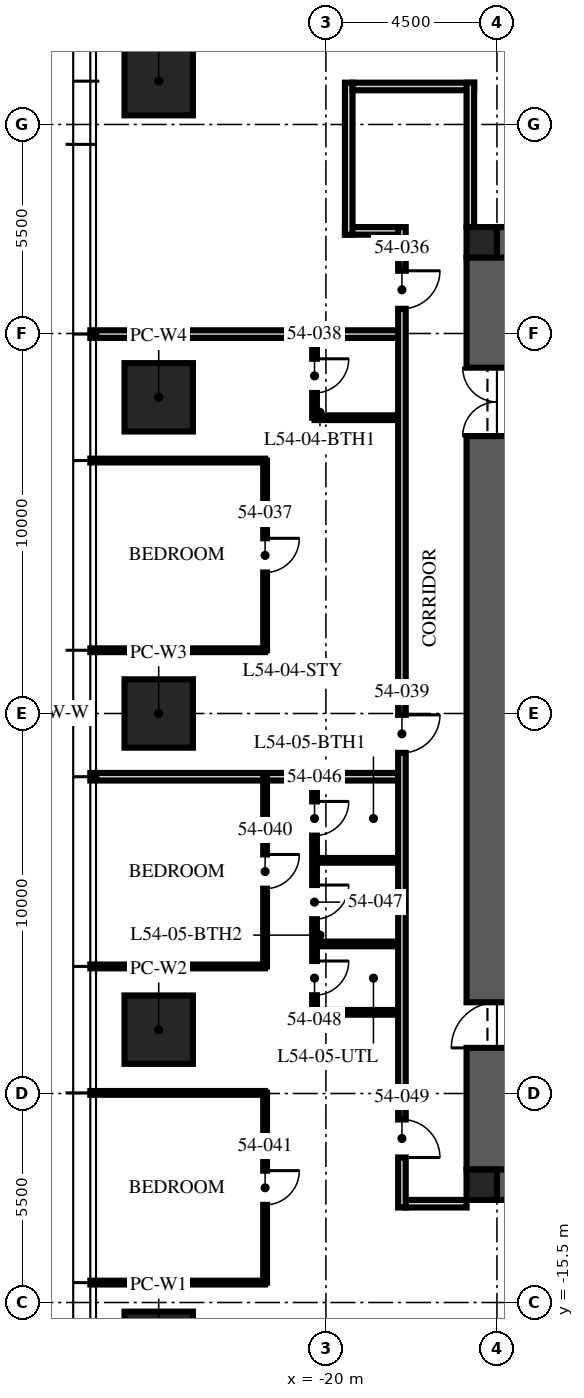
"""IFC4 building model, lengths in metres.
Left out: names, types, materials, properties, quantities, classifications, styles, units other than length and angle.
Written with IfcOpenShell. Run it as: python <this file> out.ifc"""

import sys

from ifc_helpers import new_model, si_unit, direction, frame, frame_2d, origin, origin_2d, place, context, subcontext, project, spatial, rectangle, extrude, element, fill, save


model = new_model("IFC4")
c1 = context("Model", 3, precision=1e-05, world=origin(), true_north=direction((0.0, 1.0)))
c2 = subcontext(c1, "Body", "Model", "MODEL_VIEW")
j1 = project(units=[si_unit("LENGTHUNIT", "METRE"), si_unit("PLANEANGLEUNIT", "RADIAN")], contexts=[c1])
p1 = place(None, origin())
s1 = spatial("IfcSite", under=j1, at=p1, CompositionType="ELEMENT")
p2 = place(p1, origin())
s2 = spatial("IfcBuilding", under=s1, at=p2, CompositionType="ELEMENT")
p3 = place(p2, frame((0.0, 0.0, 218.25)))
s3 = spatial("IfcBuildingStorey", under=s2, at=p3, CompositionType="ELEMENT", Elevation=218.25)
for number, where, z_axis, x_axis in (
    (1, (-15.5, 12.0, -0.25), (0.0, 0.0, 1.0), (1.0, 0.0, 0.0)),
    (2, (-15.5, -12.0, -0.25), (0.0, 0.0, 1.0), (1.0, 0.0, 0.0)),
):
    element("IfcWall", number, at=place(p3, frame(where, z_axis=z_axis, x_axis=x_axis)), inside=s3, PredefinedType="SHEAR", context=c2, shape_type="SweptSolid", body=[
        extrude(rectangle(XDim=31.0, YDim=1.6, at=frame_2d((15.5, 0.0))), origin(), (0.0, 0.0, 1.0), 3.75),
    ])
p4 = place(p3, frame((-15.5, -12.0, -0.25), z_axis=(0.0, 0.0, 1.0), x_axis=(0.0, 1.0, 0.0)))
e3 = element("IfcWall", 3, at=p4, inside=s3, PredefinedType="SHEAR", context=c2, shape_type="SweptSolid", body=[
    extrude(rectangle(XDim=24.0, YDim=1.6, at=frame_2d((12.0, 0.0))), origin(), (0.0, 0.0, 1.0), 3.75),
])
p5 = place(p4, frame((3.2, 0.0, 0.25)))
e4 = element("IfcOpeningElement", 4, at=p5, cuts=e3, PredefinedType="OPENING", context=c2, shape_type="SweptSolid", body=[
    extrude(rectangle(XDim=1.2, YDim=2.1, at=frame_2d((0.6, 1.05))), frame((0.0, 0.81, 0.0), z_axis=(0.0, -1.0, 0.0), x_axis=(1.0, 0.0, 0.0)), (0.0, 0.0, 1.0), 1.62),
])
p6 = place(p4, frame((19.3, 0.0, 0.25)))
e5 = element("IfcOpeningElement", 5, at=p6, cuts=e3, PredefinedType="OPENING", context=c2, shape_type="SweptSolid", body=[
    extrude(rectangle(XDim=1.8, YDim=2.1, at=frame_2d((0.9, 1.05))), frame((0.0, 0.81, 0.0), z_axis=(0.0, -1.0, 0.0), x_axis=(1.0, 0.0, 0.0)), (0.0, 0.0, 1.0), 1.62),
])
for number, where, z_axis, x_axis in (
    (6, (-15.9, 12.4, -0.25), (0.0, 0.0, 1.0), (1.0, 0.0, 0.0)),
    (7, (-15.9, -12.4, -0.25), (0.0, 0.0, 1.0), (1.0, 0.0, 0.0)),
):
    element("IfcColumn", number, at=place(p3, frame(where, z_axis=z_axis, x_axis=x_axis)), inside=s3, PredefinedType="COLUMN", context=c2, shape_type="SweptSolid", body=[
        extrude(rectangle(XDim=0.8, YDim=0.8, at=origin_2d()), origin(), (0.0, 0.0, 1.0), 3.75),
    ])
for number, where, z_axis, x_axis in (
    (8, (-24.4, -16.64, 0.0), (0.0, 0.0, 1.0), (0.0, 1.0, 0.0)),
    (9, (-24.4, -8.32, 0.0), (0.0, 0.0, 1.0), (0.0, 1.0, 0.0)),
    (10, (-24.4, 0.0, 0.0), (0.0, 0.0, 1.0), (0.0, 1.0, 0.0)),
    (11, (-24.4, 8.32, 0.0), (0.0, 0.0, 1.0), (0.0, 1.0, 0.0)),
    (12, (-24.4, 16.64, 0.0), (0.0, 0.0, 1.0), (0.0, 1.0, 0.0)),
):
    element("IfcColumn", number, at=place(p3, frame(where, z_axis=z_axis, x_axis=x_axis)), inside=s3, PredefinedType="COLUMN", context=c2, shape_type="SweptSolid", body=[
        extrude(rectangle(XDim=1.8, YDim=1.8, at=origin_2d()), origin(), (0.0, 0.0, 1.0), 3.75),
    ])
p7 = place(p3, frame((-18.1, 12.7, 0.0), z_axis=(0.0, 0.0, 1.0), x_axis=(-1.0, 0.0, 0.0)))
e13 = element("IfcWall", 13, at=p7, inside=s3, PredefinedType="PARTITIONING", context=c2, shape_type="SweptSolid", body=[
    extrude(rectangle(XDim=1.4, YDim=0.2, at=frame_2d((0.7, 0.0))), origin(), (0.0, 0.0, 1.0), 2.81),
])
p8 = place(p3, frame((-19.4, 12.6, 0.0), z_axis=(0.0, 0.0, 1.0), x_axis=(0.0, 1.0, 0.0)))
e14 = element("IfcWall", 14, at=p8, inside=s3, PredefinedType="PARTITIONING", context=c2, shape_type="SweptSolid", body=[
    extrude(rectangle(XDim=4.0, YDim=0.2, at=frame_2d((2.0, 0.0))), origin(), (0.0, 0.0, 1.0), 2.6),
])
p9 = place(p3, frame((-19.3, 16.5, 0.0), z_axis=(0.0, 0.0, 1.0), x_axis=(1.0, 0.0, 0.0)))
e15 = element("IfcWall", 15, at=p9, inside=s3, PredefinedType="PARTITIONING", context=c2, shape_type="SweptSolid", body=[
    extrude(rectangle(XDim=3.2, YDim=0.2, at=frame_2d((1.6, 0.0))), origin(), (0.0, 0.0, 1.0), 2.3),
])
p10 = place(p3, frame((-16.2, 16.6, 0.0), z_axis=(0.0, 0.0, 1.0), x_axis=(0.0, -1.0, 0.0)))
e16 = element("IfcWall", 16, at=p10, inside=s3, PredefinedType="PARTITIONING", context=c2, shape_type="SweptSolid", body=[
    extrude(rectangle(XDim=3.8, YDim=0.2, at=frame_2d((1.9, 0.0))), origin(), (0.0, 0.0, 1.0), 2.3),
])
p11 = place(p3, frame((-16.3, -12.9, 0.0), z_axis=(0.0, 0.0, 1.0), x_axis=(-1.0, 0.0, 0.0)))
e17 = element("IfcWall", 17, at=p11, inside=s3, PredefinedType="PARTITIONING", context=c2, shape_type="SweptSolid", body=[
    extrude(rectangle(XDim=1.6, YDim=0.2, at=frame_2d((0.8, 0.0))), origin(), (0.0, 0.0, 1.0), 2.3),
])
p12 = place(p3, frame((-18.1, 9.984, 0.0), z_axis=(0.0, 0.0, 1.0), x_axis=(-1.0, 0.0, 0.0)))
e18 = element("IfcWall", 18, at=p12, inside=s3, PredefinedType="PARTITIONING", context=c2, shape_type="SweptSolid", body=[
    extrude(rectangle(XDim=8.1, YDim=0.2, at=frame_2d((4.05, 0.0))), origin(), (0.0, 0.0, 1.0), 2.91),
])
for number, where, z_axis, x_axis in (
    (19, (-21.6, 6.656, 0.0), (0.0, 0.0, 1.0), (-1.0, 0.0, 0.0)),
    (20, (-21.6, 1.664, 0.0), (0.0, 0.0, 1.0), (-1.0, 0.0, 0.0)),
):
    element("IfcWall", number, at=place(p3, frame(where, z_axis=z_axis, x_axis=x_axis)), inside=s3, PredefinedType="PARTITIONING", context=c2, shape_type="SweptSolid", body=[
        extrude(rectangle(XDim=4.6, YDim=0.1, at=frame_2d((2.3, 0.0))), origin(), (0.0, 0.0, 1.0), 2.91),
    ])
p13 = place(p3, frame((-18.1, -1.664, 0.0), z_axis=(0.0, 0.0, 1.0), x_axis=(-1.0, 0.0, 0.0)))
e21 = element("IfcWall", 21, at=p13, inside=s3, PredefinedType="PARTITIONING", context=c2, shape_type="SweptSolid", body=[
    extrude(rectangle(XDim=8.1, YDim=0.2, at=frame_2d((4.05, 0.0))), origin(), (0.0, 0.0, 1.0), 2.91),
])
for number, where, z_axis, x_axis in (
    (22, (-21.6, -6.656, 0.0), (0.0, 0.0, 1.0), (-1.0, 0.0, 0.0)),
    (23, (-21.6, -9.984, 0.0), (0.0, 0.0, 1.0), (-1.0, 0.0, 0.0)),
    (24, (-21.6, -14.976, 0.0), (0.0, 0.0, 1.0), (-1.0, 0.0, 0.0)),
):
    element("IfcWall", number, at=place(p3, frame(where, z_axis=z_axis, x_axis=x_axis)), inside=s3, PredefinedType="PARTITIONING", context=c2, shape_type="SweptSolid", body=[
        extrude(rectangle(XDim=4.6, YDim=0.1, at=frame_2d((2.3, 0.0))), origin(), (0.0, 0.0, 1.0), 2.91),
    ])
p14 = place(p3, frame((-21.6, 6.656, 0.0), z_axis=(0.0, 0.0, 1.0), x_axis=(0.0, -1.0, 0.0)))
e25 = element("IfcWall", 25, at=p14, inside=s3, PredefinedType="PARTITIONING", context=c2, shape_type="SweptSolid", body=[
    extrude(rectangle(XDim=4.992, YDim=0.1, at=frame_2d((2.496, 0.0))), origin(), (0.0, 0.0, 1.0), 2.81),
])
p15 = place(p14, frame((2.046, 0.0, 0.0)))
e26 = element("IfcOpeningElement", 26, at=p15, cuts=e25, PredefinedType="OPENING", context=c2, shape_type="SweptSolid", body=[
    extrude(rectangle(XDim=0.9, YDim=2.1, at=frame_2d((0.45, 1.05))), frame((0.0, 0.06, 0.0), z_axis=(0.0, -1.0, 0.0), x_axis=(1.0, 0.0, 0.0)), (0.0, 0.0, 1.0), 0.12),
])
p16 = place(p3, frame((-20.3, 9.984, 0.0), z_axis=(0.0, 0.0, 1.0), x_axis=(0.0, -1.0, 0.0)))
e27 = element("IfcWall", 27, at=p16, inside=s3, PredefinedType="PARTITIONING", context=c2, shape_type="SweptSolid", body=[
    extrude(rectangle(XDim=2.2, YDim=0.125, at=frame_2d((1.1, 0.0))), origin(), (0.0, 0.0, 1.0), 2.6),
])
p17 = place(p16, frame((0.65, 0.0, 0.0)))
e28 = element("IfcOpeningElement", 28, at=p17, cuts=e27, PredefinedType="OPENING", context=c2, shape_type="SweptSolid", body=[
    extrude(rectangle(XDim=0.9, YDim=2.1, at=frame_2d((0.45, 1.05))), frame((0.0, 0.073, 0.0), z_axis=(0.0, -1.0, 0.0), x_axis=(1.0, 0.0, 0.0)), (0.0, 0.0, 1.0), 0.145),
])
p18 = place(p3, frame((-18.1, 7.784, 0.0), z_axis=(0.0, 0.0, 1.0), x_axis=(-1.0, 0.0, 0.0)))
e29 = element("IfcWall", 29, at=p18, inside=s3, PredefinedType="PARTITIONING", context=c2, shape_type="SweptSolid", body=[
    extrude(rectangle(XDim=2.2, YDim=0.125, at=frame_2d((1.1, 0.0))), origin(), (0.0, 0.0, 1.0), 3.5),
])
p19 = place(p3, frame((-21.6, -1.664, 0.0), z_axis=(0.0, 0.0, 1.0), x_axis=(0.0, -1.0, 0.0)))
e30 = element("IfcWall", 30, at=p19, inside=s3, PredefinedType="PARTITIONING", context=c2, shape_type="SweptSolid", body=[
    extrude(rectangle(XDim=4.992, YDim=0.1, at=frame_2d((2.496, 0.0))), origin(), (0.0, 0.0, 1.0), 2.81),
])
p20 = place(p19, frame((2.046, 0.0, 0.0)))
e31 = element("IfcOpeningElement", 31, at=p20, cuts=e30, PredefinedType="OPENING", context=c2, shape_type="SweptSolid", body=[
    extrude(rectangle(XDim=0.9, YDim=2.1, at=frame_2d((0.45, 1.05))), frame((0.0, 0.06, 0.0), z_axis=(0.0, -1.0, 0.0), x_axis=(1.0, 0.0, 0.0)), (0.0, 0.0, 1.0), 0.12),
])
p21 = place(p3, frame((-21.6, -9.984, 0.0), z_axis=(0.0, 0.0, 1.0), x_axis=(0.0, -1.0, 0.0)))
e32 = element("IfcWall", 32, at=p21, inside=s3, PredefinedType="PARTITIONING", context=c2, shape_type="SweptSolid", body=[
    extrude(rectangle(XDim=4.992, YDim=0.1, at=frame_2d((2.496, 0.0))), origin(), (0.0, 0.0, 1.0), 2.81),
])
p22 = place(p21, frame((2.046, 0.0, 0.0)))
e33 = element("IfcOpeningElement", 33, at=p22, cuts=e32, PredefinedType="OPENING", context=c2, shape_type="SweptSolid", body=[
    extrude(rectangle(XDim=0.9, YDim=2.1, at=frame_2d((0.45, 1.05))), frame((0.0, 0.06, 0.0), z_axis=(0.0, -1.0, 0.0), x_axis=(1.0, 0.0, 0.0)), (0.0, 0.0, 1.0), 0.12),
])
p23 = place(p3, frame((-20.3, -1.664, 0.0), z_axis=(0.0, 0.0, 1.0), x_axis=(0.0, -1.0, 0.0)))
e34 = element("IfcWall", 34, at=p23, inside=s3, PredefinedType="PARTITIONING", context=c2, shape_type="SweptSolid", body=[
    extrude(rectangle(XDim=6.2, YDim=0.125, at=frame_2d((3.1, 0.0))), origin(), (0.0, 0.0, 1.0), 2.81),
])
p24 = place(p23, frame((0.65, 0.0, 0.0)))
e35 = element("IfcOpeningElement", 35, at=p24, cuts=e34, PredefinedType="OPENING", context=c2, shape_type="SweptSolid", body=[
    extrude(rectangle(XDim=0.9, YDim=2.1, at=frame_2d((0.45, 1.05))), frame((0.0, 0.073, 0.0), z_axis=(0.0, -1.0, 0.0), x_axis=(1.0, 0.0, 0.0)), (0.0, 0.0, 1.0), 0.145),
])
p25 = place(p23, frame((2.85, 0.0, 0.0)))
e36 = element("IfcOpeningElement", 36, at=p25, cuts=e34, PredefinedType="OPENING", context=c2, shape_type="SweptSolid", body=[
    extrude(rectangle(XDim=0.9, YDim=2.1, at=frame_2d((0.45, 1.05))), frame((0.0, 0.073, 0.0), z_axis=(0.0, -1.0, 0.0), x_axis=(1.0, 0.0, 0.0)), (0.0, 0.0, 1.0), 0.145),
])
p26 = place(p23, frame((4.85, 0.0, 0.0)))
e37 = element("IfcOpeningElement", 37, at=p26, cuts=e34, PredefinedType="OPENING", context=c2, shape_type="SweptSolid", body=[
    extrude(rectangle(XDim=0.9, YDim=2.1, at=frame_2d((0.45, 1.05))), frame((0.0, 0.073, 0.0), z_axis=(0.0, -1.0, 0.0), x_axis=(1.0, 0.0, 0.0)), (0.0, 0.0, 1.0), 0.145),
])
for number, where, z_axis, x_axis in (
    (38, (-18.1, -3.864, 0.0), (0.0, 0.0, 1.0), (-1.0, 0.0, 0.0)),
    (39, (-18.1, -6.064, 0.0), (0.0, 0.0, 1.0), (-1.0, 0.0, 0.0)),
    (40, (-18.1, -7.864, 0.0), (0.0, 0.0, 1.0), (-1.0, 0.0, 0.0)),
):
    element("IfcWall", number, at=place(p3, frame(where, z_axis=z_axis, x_axis=x_axis)), inside=s3, PredefinedType="PARTITIONING", context=c2, shape_type="SweptSolid", body=[
        extrude(rectangle(XDim=2.2, YDim=0.125, at=frame_2d((1.1, 0.0))), origin(), (0.0, 0.0, 1.0), 3.5),
    ])
p27 = place(p3, frame((-18.0, 12.8, 0.0), z_axis=(0.0, 0.0, 1.0), x_axis=(0.0, -1.0, 0.0)))
e41 = element("IfcWall", 41, at=p27, inside=s3, PredefinedType="PARTITIONING", context=c2, shape_type="SweptSolid", body=[
    extrude(rectangle(XDim=25.8, YDim=0.2, at=frame_2d((12.9, 0.0))), origin(), (0.0, 0.0, 1.0), 2.6),
])
p28 = place(p27, frame((1.15, 0.0, 0.0)))
e42 = element("IfcOpeningElement", 42, at=p28, cuts=e41, PredefinedType="OPENING", context=c2, shape_type="SweptSolid", body=[
    extrude(rectangle(XDim=1.0, YDim=2.2, at=frame_2d((0.5, 1.1))), frame((0.0, 0.11, 0.0), z_axis=(0.0, -1.0, 0.0), x_axis=(1.0, 0.0, 0.0)), (0.0, 0.0, 1.0), 0.22),
])
p29 = place(p27, frame((12.836, 0.0, 0.0)))
e43 = element("IfcOpeningElement", 43, at=p29, cuts=e41, PredefinedType="OPENING", context=c2, shape_type="SweptSolid", body=[
    extrude(rectangle(XDim=1.0, YDim=2.2, at=frame_2d((0.5, 1.1))), frame((0.0, 0.11, 0.0), z_axis=(0.0, -1.0, 0.0), x_axis=(1.0, 0.0, 0.0)), (0.0, 0.0, 1.0), 0.22),
])
p30 = place(p27, frame((23.484, 0.0, 0.0)))
e44 = element("IfcOpeningElement", 44, at=p30, cuts=e41, PredefinedType="OPENING", context=c2, shape_type="SweptSolid", body=[
    extrude(rectangle(XDim=1.0, YDim=2.2, at=frame_2d((0.5, 1.1))), frame((0.0, 0.11, 0.0), z_axis=(0.0, -1.0, 0.0), x_axis=(1.0, 0.0, 0.0)), (0.0, 0.0, 1.0), 0.22),
])
p31 = place(p5, origin())
e45 = element("IfcDoor", 45, at=p31, inside=s3, OperationType="SINGLE_SWING_LEFT", PredefinedType="DOOR", context=c2, shape_type="SweptSolid", body=[
    extrude(rectangle(XDim=1.2, YDim=2.1, at=frame_2d((0.6, 1.05))), frame((0.0, 0.025, 0.0), z_axis=(0.0, -1.0, 0.0), x_axis=(1.0, 0.0, 0.0)), (0.0, 0.0, 1.0), 0.05),
])
fill(e4, e45)
p32 = place(p6, origin())
e46 = element("IfcDoor", 46, at=p32, inside=s3, OperationType="DOUBLE_DOOR_SINGLE_SWING", PredefinedType="DOOR", context=c2, shape_type="SweptSolid", body=[
    extrude(rectangle(XDim=1.8, YDim=2.1, at=frame_2d((0.9, 1.05))), frame((0.0, 0.025, 0.0), z_axis=(0.0, -1.0, 0.0), x_axis=(1.0, 0.0, 0.0)), (0.0, 0.0, 1.0), 0.05),
])
fill(e5, e46)
p33 = place(p28, origin())
e47 = element("IfcDoor", 47, at=p33, inside=s3, OperationType="SINGLE_SWING_LEFT", PredefinedType="DOOR", context=c2, shape_type="SweptSolid", body=[
    extrude(rectangle(XDim=1.0, YDim=2.2, at=frame_2d((0.5, 1.1))), frame((0.0, 0.025, 0.0), z_axis=(0.0, -1.0, 0.0), x_axis=(1.0, 0.0, 0.0)), (0.0, 0.0, 1.0), 0.05),
])
fill(e42, e47)
p34 = place(p15, origin())
e48 = element("IfcDoor", 48, at=p34, inside=s3, OperationType="SINGLE_SWING_LEFT", PredefinedType="DOOR", context=c2, shape_type="SweptSolid", body=[
    extrude(rectangle(XDim=0.9, YDim=2.1, at=frame_2d((0.45, 1.05))), frame((0.0, 0.025, 0.0), z_axis=(0.0, -1.0, 0.0), x_axis=(1.0, 0.0, 0.0)), (0.0, 0.0, 1.0), 0.05),
])
fill(e26, e48)
p35 = place(p17, origin())
e49 = element("IfcDoor", 49, at=p35, inside=s3, OperationType="SINGLE_SWING_LEFT", PredefinedType="DOOR", context=c2, shape_type="SweptSolid", body=[
    extrude(rectangle(XDim=0.9, YDim=2.1, at=frame_2d((0.45, 1.05))), frame((0.0, 0.025, 0.0), z_axis=(0.0, -1.0, 0.0), x_axis=(1.0, 0.0, 0.0)), (0.0, 0.0, 1.0), 0.05),
])
fill(e28, e49)
p36 = place(p29, origin())
e50 = element("IfcDoor", 50, at=p36, inside=s3, OperationType="SINGLE_SWING_LEFT", PredefinedType="DOOR", context=c2, shape_type="SweptSolid", body=[
    extrude(rectangle(XDim=1.0, YDim=2.2, at=frame_2d((0.5, 1.1))), frame((0.0, 0.025, 0.0), z_axis=(0.0, -1.0, 0.0), x_axis=(1.0, 0.0, 0.0)), (0.0, 0.0, 1.0), 0.05),
])
fill(e43, e50)
p37 = place(p20, origin())
e51 = element("IfcDoor", 51, at=p37, inside=s3, OperationType="SINGLE_SWING_LEFT", PredefinedType="DOOR", context=c2, shape_type="SweptSolid", body=[
    extrude(rectangle(XDim=0.9, YDim=2.1, at=frame_2d((0.45, 1.05))), frame((0.0, 0.025, 0.0), z_axis=(0.0, -1.0, 0.0), x_axis=(1.0, 0.0, 0.0)), (0.0, 0.0, 1.0), 0.05),
])
fill(e31, e51)
p38 = place(p22, origin())
e52 = element("IfcDoor", 52, at=p38, inside=s3, OperationType="SINGLE_SWING_LEFT", PredefinedType="DOOR", context=c2, shape_type="SweptSolid", body=[
    extrude(rectangle(XDim=0.9, YDim=2.1, at=frame_2d((0.45, 1.05))), frame((0.0, 0.025, 0.0), z_axis=(0.0, -1.0, 0.0), x_axis=(1.0, 0.0, 0.0)), (0.0, 0.0, 1.0), 0.05),
])
fill(e33, e52)
p39 = place(p24, origin())
e53 = element("IfcDoor", 53, at=p39, inside=s3, OperationType="SINGLE_SWING_LEFT", PredefinedType="DOOR", context=c2, shape_type="SweptSolid", body=[
    extrude(rectangle(XDim=0.9, YDim=2.1, at=frame_2d((0.45, 1.05))), frame((0.0, 0.025, 0.0), z_axis=(0.0, -1.0, 0.0), x_axis=(1.0, 0.0, 0.0)), (0.0, 0.0, 1.0), 0.05),
])
fill(e35, e53)
p40 = place(p25, origin())
e54 = element("IfcDoor", 54, at=p40, inside=s3, OperationType="SINGLE_SWING_LEFT", PredefinedType="DOOR", context=c2, shape_type="SweptSolid", body=[
    extrude(rectangle(XDim=0.9, YDim=2.1, at=frame_2d((0.45, 1.05))), frame((0.0, 0.025, 0.0), z_axis=(0.0, -1.0, 0.0), x_axis=(1.0, 0.0, 0.0)), (0.0, 0.0, 1.0), 0.05),
])
fill(e36, e54)
p41 = place(p26, origin())
e55 = element("IfcDoor", 55, at=p41, inside=s3, OperationType="SINGLE_SWING_LEFT", PredefinedType="DOOR", context=c2, shape_type="SweptSolid", body=[
    extrude(rectangle(XDim=0.9, YDim=2.1, at=frame_2d((0.45, 1.05))), frame((0.0, 0.025, 0.0), z_axis=(0.0, -1.0, 0.0), x_axis=(1.0, 0.0, 0.0)), (0.0, 0.0, 1.0), 0.05),
])
fill(e37, e55)
p42 = place(p30, origin())
e56 = element("IfcDoor", 56, at=p42, inside=s3, OperationType="SINGLE_SWING_RIGHT", PredefinedType="DOOR", context=c2, shape_type="SweptSolid", body=[
    extrude(rectangle(XDim=1.0, YDim=2.2, at=frame_2d((0.5, 1.1))), frame((0.0, 0.025, 0.0), z_axis=(0.0, -1.0, 0.0), x_axis=(1.0, 0.0, 0.0)), (0.0, 0.0, 1.0), 0.05),
])
fill(e44, e56)
save(model, sys.argv[1])
